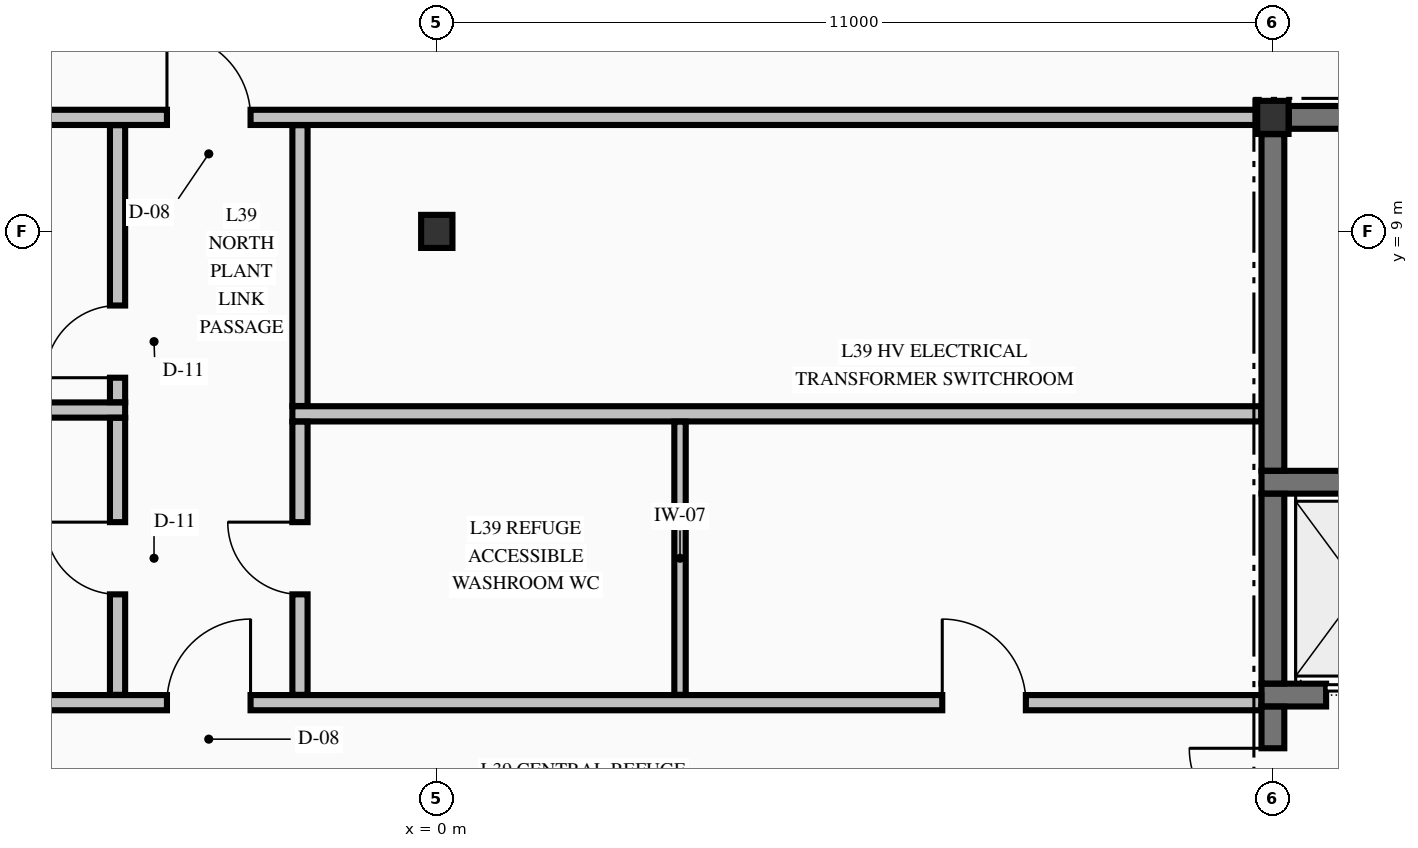
"""IFC4 building model, lengths in metres.
Left out: names, types, materials, properties, quantities, classifications, styles, units other than length and angle.
Written with IfcOpenShell. Run it as: python <this file> out.ifc"""

import sys

from ifc_helpers import new_model, si_unit, direction, frame, frame_2d, origin, origin_2d, place, context, subcontext, project, spatial, rectangle, i_section, extrude, element, fill, save


model = new_model("IFC4")
c1 = context("Model", 3, precision=1e-05, world=origin(), true_north=direction((0.0, 1.0)))
c2 = subcontext(c1, "Body", "Model", "MODEL_VIEW")
j1 = project(units=[si_unit("LENGTHUNIT", "METRE"), si_unit("PLANEANGLEUNIT", "RADIAN")], contexts=[c1])
p1 = place(None, origin())
s1 = spatial("IfcSite", under=j1, at=p1, CompositionType="ELEMENT")
p2 = place(p1, origin())
s2 = spatial("IfcBuilding", under=s1, at=p2, CompositionType="ELEMENT")
p3 = place(p2, frame((0.0, 0.0, 153.48)))
s3 = spatial("IfcBuildingStorey", under=s2, at=p3, CompositionType="ELEMENT", Elevation=153.48)
for number, where, z_axis, x_axis in (
    (1, (11.0, 10.5, -0.425), (0.0, 0.0, 1.0), (1.0, 0.0, 0.0)),
    (2, (0.0, 9.0, -0.425), (0.0, 0.0, 1.0), (1.0, 0.0, 0.0)),
):
    element("IfcColumn", number, at=place(p3, frame(where, z_axis=z_axis, x_axis=x_axis)), inside=s3, PredefinedType="COLUMN", context=c2, shape_type="SweptSolid", body=[
        extrude(i_section(OverallWidth=0.412, OverallDepth=0.435, WebThickness=0.036, FlangeThickness=0.058, FilletRadius=0.015, at=origin_2d()), origin(), (0.0, 0.0, 1.0), 4.76),
    ])
p4 = place(p3, frame((10.85, 2.9, 0.0), z_axis=(0.0, 0.0, 1.0), x_axis=(1.0, 0.0, 0.0)))
e3 = element("IfcWall", 3, at=p4, inside=s3, PredefinedType="SHEAR", context=c2, shape_type="SweptSolid", body=[
    extrude(rectangle(XDim=4.025, YDim=0.3, at=frame_2d((2.012, 0.0))), origin(), (0.0, 0.0, 1.0), 4.335),
])
p5 = place(p4, frame((0.85, 0.0, 0.0)))
e4 = element("IfcOpeningElement", 4, at=p5, cuts=e3, PredefinedType="OPENING", context=c2, shape_type="SweptSolid", body=[
    extrude(rectangle(XDim=1.1, YDim=2.2, at=frame_2d((0.55, 1.1))), frame((0.0, 0.16, 0.0), z_axis=(0.0, -1.0, 0.0), x_axis=(1.0, 0.0, 0.0)), (0.0, 0.0, 1.0), 0.32),
])
p6 = place(p3, frame((10.85, 5.7, 0.0), z_axis=(0.0, 0.0, 1.0), x_axis=(1.0, 0.0, 0.0)))
e5 = element("IfcWall", 5, at=p6, inside=s3, PredefinedType="SHEAR", context=c2, shape_type="SweptSolid", body=[
    extrude(rectangle(XDim=4.025, YDim=0.3, at=frame_2d((2.012, 0.0))), origin(), (0.0, 0.0, 1.0), 4.335),
])
p7 = place(p3, frame((11.21, 10.5, 0.0), z_axis=(0.0, 0.0, 1.0), x_axis=(1.0, 0.0, 0.0)))
e6 = element("IfcWall", 6, at=p7, inside=s3, PredefinedType="SHEAR", context=c2, shape_type="SweptSolid", body=[
    extrude(rectangle(XDim=3.49, YDim=0.3, at=frame_2d((1.745, 0.0))), origin(), (0.0, 0.0, 1.0), 4.335),
])
p8 = place(p7, frame((1.765, 0.0, 0.0)))
e7 = element("IfcOpeningElement", 7, at=p8, cuts=e6, PredefinedType="OPENING", context=c2, shape_type="SweptSolid", body=[
    extrude(rectangle(XDim=0.95, YDim=2.02, at=frame_2d((0.475, 1.01))), frame((0.0, 0.16, 0.0), z_axis=(0.0, -1.0, 0.0), x_axis=(1.0, 0.0, 0.0)), (0.0, 0.0, 1.0), 0.32),
])
p9 = place(p3, frame((-10.847, 2.8, 0.0), z_axis=(0.0, 0.0, 1.0), x_axis=(1.0, 0.0, 0.0)))
e8 = element("IfcWall", 8, at=p9, inside=s3, PredefinedType="PARTITIONING", context=c2, shape_type="SweptSolid", body=[
    extrude(rectangle(XDim=21.694, YDim=0.2, at=frame_2d((10.847, 0.0))), origin(), (0.0, 0.0, 1.0), 4.335),
])
p10 = place(p9, frame((7.297, 0.0, 0.0)))
e9 = element("IfcOpeningElement", 9, at=p10, cuts=e8, PredefinedType="OPENING", context=c2, shape_type="SweptSolid", body=[
    extrude(rectangle(XDim=1.1, YDim=2.15, at=frame_2d((0.55, 1.075))), frame((0.0, 0.11, 0.0), z_axis=(0.0, -1.0, 0.0), x_axis=(1.0, 0.0, 0.0)), (0.0, 0.0, 1.0), 0.22),
])
p11 = place(p9, frame((17.497, 0.0, 0.0)))
e10 = element("IfcOpeningElement", 10, at=p11, cuts=e8, PredefinedType="OPENING", context=c2, shape_type="SweptSolid", body=[
    extrude(rectangle(XDim=1.1, YDim=2.15, at=frame_2d((0.55, 1.075))), frame((0.0, 0.11, 0.0), z_axis=(0.0, -1.0, 0.0), x_axis=(1.0, 0.0, 0.0)), (0.0, 0.0, 1.0), 0.22),
])
p12 = place(p3, frame((-1.9, 6.6, 0.0), z_axis=(0.0, 0.0, 1.0), x_axis=(1.0, 0.0, 0.0)))
e11 = element("IfcWall", 11, at=p12, inside=s3, PredefinedType="PARTITIONING", context=c2, shape_type="SweptSolid", body=[
    extrude(rectangle(XDim=12.747, YDim=0.2, at=frame_2d((6.374, 0.0))), origin(), (0.0, 0.0, 1.0), 4.335),
])
p13 = place(p3, frame((-10.847, 6.65, 0.0), z_axis=(0.0, 0.0, 1.0), x_axis=(1.0, 0.0, 0.0)))
e12 = element("IfcWall", 12, at=p13, inside=s3, PredefinedType="PARTITIONING", context=c2, shape_type="SweptSolid", body=[
    extrude(rectangle(XDim=6.747, YDim=0.2, at=frame_2d((3.374, 0.0))), origin(), (0.0, 0.0, 1.0), 4.335),
])
p14 = place(p3, frame((-10.788, 10.5, 0.0), z_axis=(0.0, 0.0, 1.0), x_axis=(1.0, 0.0, 0.0)))
e13 = element("IfcWall", 13, at=p14, inside=s3, PredefinedType="PARTITIONING", context=c2, shape_type="SweptSolid", body=[
    extrude(rectangle(XDim=21.576, YDim=0.2, at=frame_2d((10.788, 0.0))), origin(), (0.0, 0.0, 1.0), 4.335),
])
p15 = place(p14, frame((7.238, 0.0, 0.0)))
e14 = element("IfcOpeningElement", 14, at=p15, cuts=e13, PredefinedType="OPENING", context=c2, shape_type="SweptSolid", body=[
    extrude(rectangle(XDim=1.1, YDim=2.15, at=frame_2d((0.55, 1.075))), frame((0.0, 0.11, 0.0), z_axis=(0.0, -1.0, 0.0), x_axis=(1.0, 0.0, 0.0)), (0.0, 0.0, 1.0), 0.22),
])
p16 = place(p3, frame((11.0, 0.221, 0.0), z_axis=(0.0, 0.0, 1.0), x_axis=(0.0, 1.0, 0.0)))
e15 = element("IfcWall", 15, at=p16, inside=s3, PredefinedType="SHEAR", context=c2, shape_type="SweptSolid", body=[
    extrude(rectangle(XDim=2.527, YDim=0.3, at=frame_2d((1.263, 0.0))), origin(), (0.0, 0.0, 1.0), 4.335),
])
p17 = place(p16, frame((0.878, 0.0, 0.0)))
e16 = element("IfcOpeningElement", 16, at=p17, cuts=e15, PredefinedType="OPENING", context=c2, shape_type="SweptSolid", body=[
    extrude(rectangle(XDim=1.1, YDim=2.15, at=frame_2d((0.55, 1.075))), frame((0.0, 0.16, 0.0), z_axis=(0.0, -1.0, 0.0), x_axis=(1.0, 0.0, 0.0)), (0.0, 0.0, 1.0), 0.32),
])
p18 = place(p3, frame((11.0, 3.052, 0.0), z_axis=(0.0, 0.0, 1.0), x_axis=(0.0, 1.0, 0.0)))
e17 = element("IfcWall", 17, at=p18, inside=s3, PredefinedType="SHEAR", context=c2, shape_type="SweptSolid", body=[
    extrude(rectangle(XDim=2.496, YDim=0.3, at=frame_2d((1.248, 0.0))), origin(), (0.0, 0.0, 1.0), 4.335),
])
p19 = place(p3, frame((11.0, 5.852, 0.0), z_axis=(0.0, 0.0, 1.0), x_axis=(0.0, 1.0, 0.0)))
e18 = element("IfcWall", 18, at=p19, inside=s3, PredefinedType="SHEAR", context=c2, shape_type="SweptSolid", body=[
    extrude(rectangle(XDim=4.427, YDim=0.3, at=frame_2d((2.213, 0.0))), origin(), (0.0, 0.0, 1.0), 4.335),
])
p20 = place(p3, frame((-4.2, 2.903, 0.0), z_axis=(0.0, 0.0, 1.0), x_axis=(0.0, 1.0, 0.0)))
e19 = element("IfcWall", 19, at=p20, inside=s3, PredefinedType="PARTITIONING", context=c2, shape_type="SweptSolid", body=[
    extrude(rectangle(XDim=3.644, YDim=0.2, at=frame_2d((1.822, 0.0))), origin(), (0.0, 0.0, 1.0), 4.335),
])
p21 = place(p20, frame((1.322, 0.0, 0.0)))
e20 = element("IfcOpeningElement", 20, at=p21, cuts=e19, PredefinedType="OPENING", context=c2, shape_type="SweptSolid", body=[
    extrude(rectangle(XDim=0.95, YDim=2.15, at=frame_2d((0.475, 1.075))), frame((0.0, 0.11, 0.0), z_axis=(0.0, -1.0, 0.0), x_axis=(1.0, 0.0, 0.0)), (0.0, 0.0, 1.0), 0.22),
])
p22 = place(p3, frame((-4.2, 6.753, 0.0), z_axis=(0.0, 0.0, 1.0), x_axis=(0.0, 1.0, 0.0)))
e21 = element("IfcWall", 21, at=p22, inside=s3, PredefinedType="PARTITIONING", context=c2, shape_type="SweptSolid", body=[
    extrude(rectangle(XDim=3.644, YDim=0.2, at=frame_2d((1.822, 0.0))), origin(), (0.0, 0.0, 1.0), 4.335),
])
p23 = place(p22, frame((0.322, 0.0, 0.0)))
e22 = element("IfcOpeningElement", 22, at=p23, cuts=e21, PredefinedType="OPENING", context=c2, shape_type="SweptSolid", body=[
    extrude(rectangle(XDim=0.95, YDim=2.15, at=frame_2d((0.475, 1.075))), frame((0.0, 0.11, 0.0), z_axis=(0.0, -1.0, 0.0), x_axis=(1.0, 0.0, 0.0)), (0.0, 0.0, 1.0), 0.22),
])
p24 = place(p3, frame((-1.8, 2.903, 0.0), z_axis=(0.0, 0.0, 1.0), x_axis=(0.0, 1.0, 0.0)))
e23 = element("IfcWall", 23, at=p24, inside=s3, PredefinedType="PARTITIONING", context=c2, shape_type="SweptSolid", body=[
    extrude(rectangle(XDim=3.594, YDim=0.2, at=frame_2d((1.797, 0.0))), origin(), (0.0, 0.0, 1.0), 4.335),
])
p25 = place(p24, frame((1.322, 0.0, 0.0)))
e24 = element("IfcOpeningElement", 24, at=p25, cuts=e23, PredefinedType="OPENING", context=c2, shape_type="SweptSolid", body=[
    extrude(rectangle(XDim=0.95, YDim=2.15, at=frame_2d((0.475, 1.075))), frame((0.0, 0.11, 0.0), z_axis=(0.0, -1.0, 0.0), x_axis=(1.0, 0.0, 0.0)), (0.0, 0.0, 1.0), 0.22),
])
p26 = place(p3, frame((-1.8, 6.703, 0.0), z_axis=(0.0, 0.0, 1.0), x_axis=(0.0, 1.0, 0.0)))
e25 = element("IfcWall", 25, at=p26, inside=s3, PredefinedType="PARTITIONING", context=c2, shape_type="SweptSolid", body=[
    extrude(rectangle(XDim=3.694, YDim=0.2, at=frame_2d((1.847, 0.0))), origin(), (0.0, 0.0, 1.0), 4.335),
])
p27 = place(p3, frame((3.2, 2.903, 0.0), z_axis=(0.0, 0.0, 1.0), x_axis=(0.0, 1.0, 0.0)))
e26 = element("IfcWall", 26, at=p27, inside=s3, PredefinedType="PARTITIONING", context=c2, shape_type="SweptSolid", body=[
    extrude(rectangle(XDim=3.594, YDim=0.15, at=frame_2d((1.797, 0.0))), origin(), (0.0, 0.0, 1.0), 4.335),
])
p28 = place(p17, origin())
e27 = element("IfcDoor", 27, at=p28, inside=s3, OperationType="SINGLE_SWING_RIGHT", PredefinedType="DOOR", context=c2, shape_type="SweptSolid", body=[
    extrude(rectangle(XDim=1.1, YDim=2.15, at=frame_2d((0.55, 1.075))), frame((0.0, 0.025, 0.0), z_axis=(0.0, -1.0, 0.0), x_axis=(1.0, 0.0, 0.0)), (0.0, 0.0, 1.0), 0.05),
])
fill(e16, e27)
p29 = place(p5, origin())
e28 = element("IfcDoor", 28, at=p29, inside=s3, OperationType="SLIDING_TO_RIGHT", PredefinedType="DOOR", context=c2, shape_type="SweptSolid", body=[
    extrude(rectangle(XDim=1.1, YDim=2.2, at=frame_2d((0.55, 1.1))), frame((0.0, 0.025, 0.0), z_axis=(0.0, -1.0, 0.0), x_axis=(1.0, 0.0, 0.0)), (0.0, 0.0, 1.0), 0.05),
])
fill(e4, e28)
p30 = place(p10, origin())
e29 = element("IfcDoor", 29, at=p30, inside=s3, OperationType="SINGLE_SWING_RIGHT", PredefinedType="DOOR", context=c2, shape_type="SweptSolid", body=[
    extrude(rectangle(XDim=1.1, YDim=2.15, at=frame_2d((0.55, 1.075))), frame((0.0, 0.025, 0.0), z_axis=(0.0, -1.0, 0.0), x_axis=(1.0, 0.0, 0.0)), (0.0, 0.0, 1.0), 0.05),
])
fill(e9, e29)
p31 = place(p15, origin())
e30 = element("IfcDoor", 30, at=p31, inside=s3, OperationType="SINGLE_SWING_LEFT", PredefinedType="DOOR", context=c2, shape_type="SweptSolid", body=[
    extrude(rectangle(XDim=1.1, YDim=2.15, at=frame_2d((0.55, 1.075))), frame((0.0, 0.025, 0.0), z_axis=(0.0, -1.0, 0.0), x_axis=(1.0, 0.0, 0.0)), (0.0, 0.0, 1.0), 0.05),
])
fill(e14, e30)
p32 = place(p21, origin())
e31 = element("IfcDoor", 31, at=p32, inside=s3, OperationType="SINGLE_SWING_RIGHT", PredefinedType="DOOR", context=c2, shape_type="SweptSolid", body=[
    extrude(rectangle(XDim=0.95, YDim=2.15, at=frame_2d((0.475, 1.075))), frame((0.0, 0.025, 0.0), z_axis=(0.0, -1.0, 0.0), x_axis=(1.0, 0.0, 0.0)), (0.0, 0.0, 1.0), 0.05),
])
fill(e20, e31)
p33 = place(p23, origin())
e32 = element("IfcDoor", 32, at=p33, inside=s3, OperationType="SINGLE_SWING_LEFT", PredefinedType="DOOR", context=c2, shape_type="SweptSolid", body=[
    extrude(rectangle(XDim=0.95, YDim=2.15, at=frame_2d((0.475, 1.075))), frame((0.0, 0.025, 0.0), z_axis=(0.0, -1.0, 0.0), x_axis=(1.0, 0.0, 0.0)), (0.0, 0.0, 1.0), 0.05),
])
fill(e22, e32)
p34 = place(p25, origin())
e33 = element("IfcDoor", 33, at=p34, inside=s3, OperationType="SINGLE_SWING_RIGHT", PredefinedType="DOOR", context=c2, shape_type="SweptSolid", body=[
    extrude(rectangle(XDim=0.95, YDim=2.15, at=frame_2d((0.475, 1.075))), frame((0.0, 0.025, 0.0), z_axis=(0.0, -1.0, 0.0), x_axis=(1.0, 0.0, 0.0)), (0.0, 0.0, 1.0), 0.05),
])
fill(e24, e33)
p35 = place(p11, origin())
e34 = element("IfcDoor", 34, at=p35, inside=s3, OperationType="SINGLE_SWING_LEFT", PredefinedType="DOOR", context=c2, shape_type="SweptSolid", body=[
    extrude(rectangle(XDim=1.1, YDim=2.15, at=frame_2d((0.55, 1.075))), frame((0.0, 0.025, 0.0), z_axis=(0.0, -1.0, 0.0), x_axis=(1.0, 0.0, 0.0)), (0.0, 0.0, 1.0), 0.05),
])
fill(e10, e34)
save(model, sys.argv[1])
